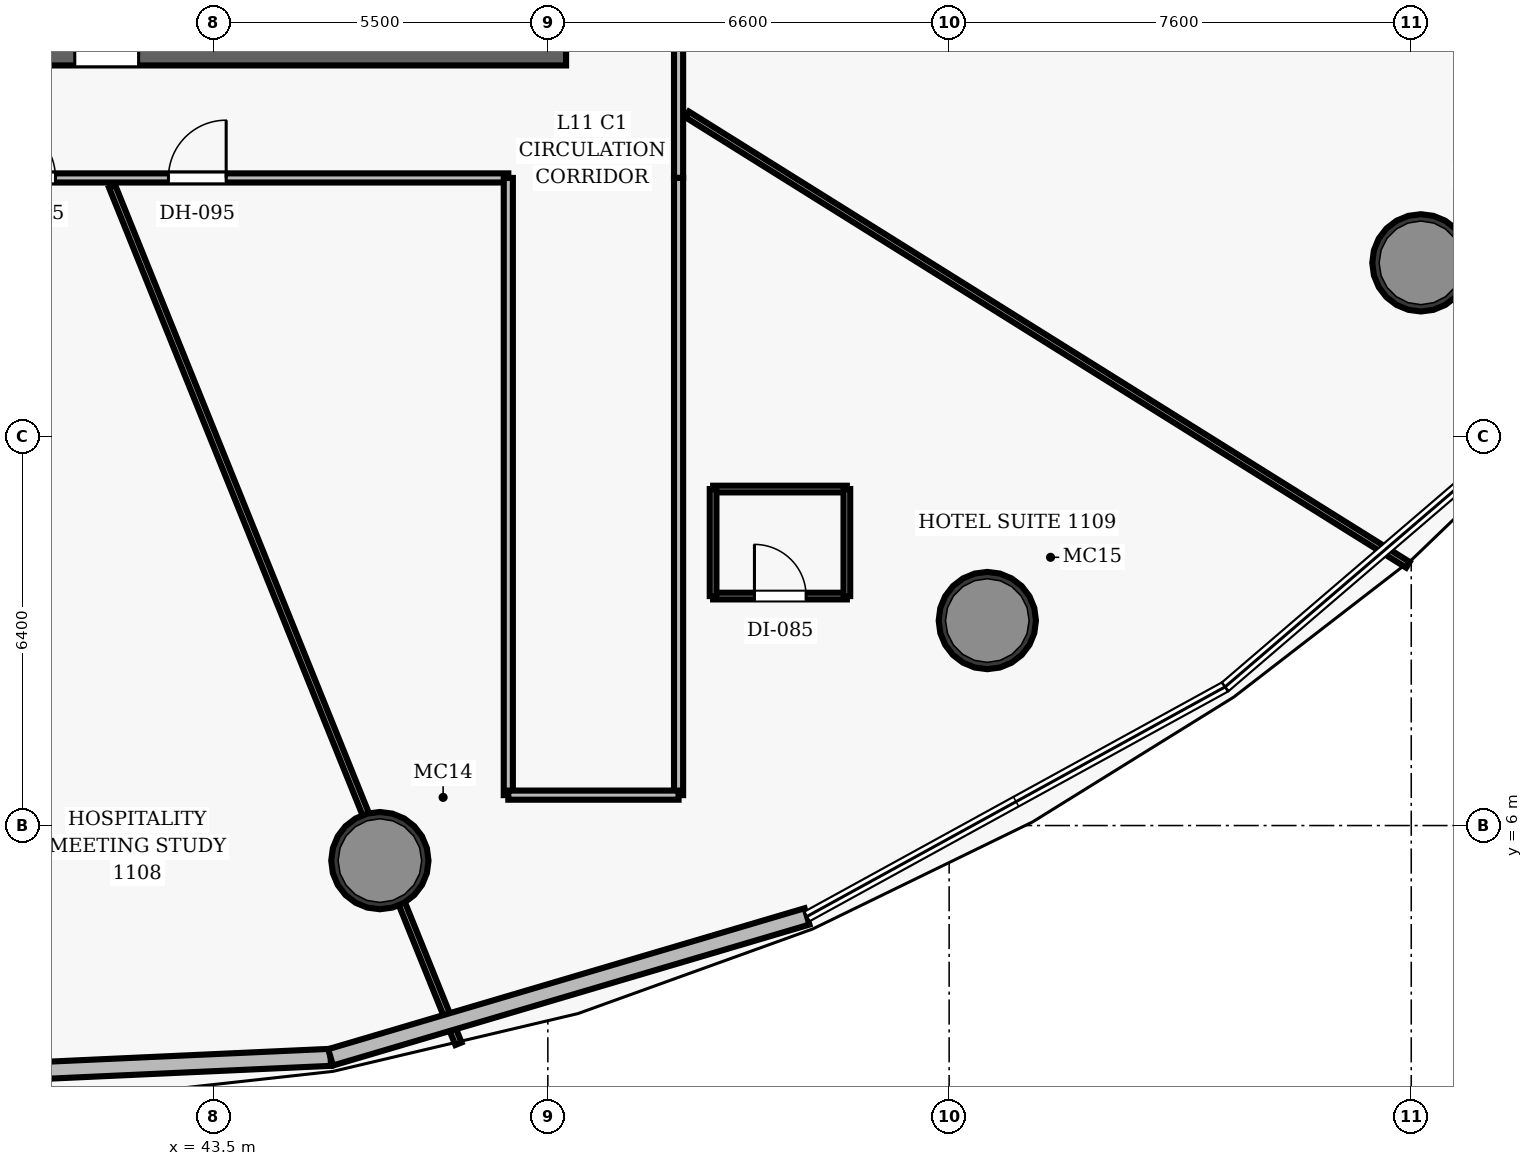
"""IFC4 building model, lengths in metres.
Left out: names, types, materials, properties, quantities, classifications, styles, units other than length and angle.
Written with IfcOpenShell. Run it as: python <this file> out.ifc"""

import sys

from ifc_helpers import new_model, si_unit, direction, frame, frame_2d, origin, origin_2d, place, context, subcontext, project, spatial, rectangle, hollow_circle, extrude, element, fill, save


model = new_model("IFC4")
c1 = context("Model", 3, precision=1e-05, world=origin(), true_north=direction((0.0, 1.0)))
c2 = subcontext(c1, "Body", "Model", "MODEL_VIEW")
j1 = project(units=[si_unit("LENGTHUNIT", "METRE"), si_unit("PLANEANGLEUNIT", "RADIAN")], contexts=[c1])
p1 = place(None, origin())
s1 = spatial("IfcSite", under=j1, at=p1, CompositionType="ELEMENT")
p2 = place(p1, origin())
s2 = spatial("IfcBuilding", under=s1, at=p2, CompositionType="ELEMENT")
p3 = place(p2, frame((0.0, 0.0, 55.4)))
s3 = spatial("IfcBuildingStorey", under=s2, at=p3, CompositionType="ELEMENT", Elevation=55.4)
p4 = place(p3, frame((26.7, 18.8, 0.0), z_axis=(0.0, 0.0, 1.0), x_axis=(1.0, 0.0, 0.0)))
e1 = element("IfcWall", 1, at=p4, inside=s3, PredefinedType="SHEAR", context=c2, shape_type="SweptSolid", body=[
    extrude(rectangle(XDim=22.6, YDim=0.6, at=frame_2d((11.3, 0.0))), origin(), (0.0, 0.0, 1.0), 3.5),
])
p5 = place(p4, frame((14.52, 0.0, 0.0)))
e2 = element("IfcOpeningElement", 2, at=p5, cuts=e1, PredefinedType="OPENING", context=c2, shape_type="SweptSolid", body=[
    extrude(rectangle(XDim=1.05, YDim=2.15, at=frame_2d((0.525, 1.075))), frame((0.0, 0.31, 0.0), z_axis=(0.0, -1.0, 0.0), x_axis=(1.0, 0.0, 0.0)), (0.0, 0.0, 1.0), 0.62),
])
for number, where, z_axis, x_axis in (
    (3, (46.238, 5.423, 0.0), (0.0, 0.0, 1.0), (1.0, 0.0, 0.0)),
    (4, (56.228, 9.371, 0.0), (0.0, 0.0, 1.0), (1.0, 0.0, 0.0)),
    (5, (63.359, 15.254, 0.0), (0.0, 0.0, 1.0), (1.0, 0.0, 0.0)),
):
    element("IfcColumn", number, at=place(p3, frame(where, z_axis=z_axis, x_axis=x_axis)), inside=s3, PredefinedType="COLUMN", context=c2, shape_type="SweptSolid", body=[
        extrude(hollow_circle(Radius=0.8, WallThickness=0.06, at=origin_2d()), origin(), (0.0, 0.0, 1.0), 3.5),
    ])
p6 = place(p3, frame((24.85, 16.65, 0.0), z_axis=(0.0, 0.0, 1.0), x_axis=(1.0, 0.0, 0.0)))
e6 = element("IfcWall", 6, at=p6, inside=s3, PredefinedType="PARTITIONING", context=c2, shape_type="SweptSolid", body=[
    extrude(rectangle(XDim=23.5, YDim=0.15, at=frame_2d((11.75, 0.0))), origin(), (0.0, 0.0, 1.0), 2.6),
])
p7 = place(p6, frame((8.216, 0.0, 0.0)))
e7 = element("IfcOpeningElement", 7, at=p7, cuts=e6, PredefinedType="OPENING", context=c2, shape_type="SweptSolid", body=[
    extrude(rectangle(XDim=0.95, YDim=2.15, at=frame_2d((0.475, 1.075))), frame((0.0, 0.085, 0.0), z_axis=(0.0, -1.0, 0.0), x_axis=(1.0, 0.0, 0.0)), (0.0, 0.0, 1.0), 0.17),
])
p8 = place(p6, frame((15.103, 0.0, 0.0)))
e8 = element("IfcOpeningElement", 8, at=p8, cuts=e6, PredefinedType="OPENING", context=c2, shape_type="SweptSolid", body=[
    extrude(rectangle(XDim=0.95, YDim=2.15, at=frame_2d((0.475, 1.075))), frame((0.0, 0.085, 0.0), z_axis=(0.0, -1.0, 0.0), x_axis=(1.0, 0.0, 0.0)), (0.0, 0.0, 1.0), 0.17),
])
p9 = place(p6, frame((17.91, 0.0, 0.0)))
e9 = element("IfcOpeningElement", 9, at=p9, cuts=e6, PredefinedType="OPENING", context=c2, shape_type="SweptSolid", body=[
    extrude(rectangle(XDim=0.95, YDim=2.15, at=frame_2d((0.475, 1.075))), frame((0.0, 0.085, 0.0), z_axis=(0.0, -1.0, 0.0), x_axis=(1.0, 0.0, 0.0)), (0.0, 0.0, 1.0), 0.17),
])
p10 = place(p3, frame((51.15, 16.65, 0.0), z_axis=(0.0, 0.0, 1.0), x_axis=(0.0, 1.0, 0.0)))
e10 = element("IfcWall", 10, at=p10, inside=s3, PredefinedType="PARTITIONING", context=c2, shape_type="SweptSolid", body=[
    extrude(rectangle(XDim=15.9, YDim=0.15, at=frame_2d((7.95, 0.0))), origin(), (0.0, 0.0, 1.0), 2.6),
])
p11 = place(p10, frame((10.986, 0.0, 0.0)))
e11 = element("IfcOpeningElement", 11, at=p11, cuts=e10, PredefinedType="OPENING", context=c2, shape_type="SweptSolid", body=[
    extrude(rectangle(XDim=0.95, YDim=2.15, at=frame_2d((0.475, 1.075))), frame((0.0, 0.085, 0.0), z_axis=(0.0, -1.0, 0.0), x_axis=(1.0, 0.0, 0.0)), (0.0, 0.0, 1.0), 0.17),
])
p12 = place(p10, frame((7.645, 0.0, 0.0)))
e12 = element("IfcOpeningElement", 12, at=p12, cuts=e10, PredefinedType="OPENING", context=c2, shape_type="SweptSolid", body=[
    extrude(rectangle(XDim=0.95, YDim=2.15, at=frame_2d((0.475, 1.075))), frame((0.0, 0.085, 0.0), z_axis=(0.0, -1.0, 0.0), x_axis=(1.0, 0.0, 0.0)), (0.0, 0.0, 1.0), 0.17),
])
for number, where, z_axis, x_axis in (
    (13, (48.35, 6.5, 0.0), (0.0, 0.0, 1.0), (0.0, 1.0, 0.0)),
    (14, (51.15, 6.5, 0.0), (0.0, 0.0, 1.0), (0.0, 1.0, 0.0)),
):
    element("IfcWall", number, at=place(p3, frame(where, z_axis=z_axis, x_axis=x_axis)), inside=s3, PredefinedType="PARTITIONING", context=c2, shape_type="SweptSolid", body=[
        extrude(rectangle(XDim=10.15, YDim=0.15, at=frame_2d((5.075, 0.0))), origin(), (0.0, 0.0, 1.0), 2.6),
    ])
p13 = place(p3, frame((48.35, 6.5, 0.0), z_axis=(0.0, 0.0, 1.0), x_axis=(1.0, 0.0, 0.0)))
e15 = element("IfcWall", 15, at=p13, inside=s3, PredefinedType="PARTITIONING", context=c2, shape_type="SweptSolid", body=[
    extrude(rectangle(XDim=2.8, YDim=0.15, at=frame_2d((1.4, 0.0))), origin(), (0.0, 0.0, 1.0), 2.6),
])
p14 = place(p3, frame((41.834, 16.51, 0.0), z_axis=(0.0, 0.0, 1.0), x_axis=(0.374602418555, -0.927185541309, 0.0)))
e16 = element("IfcWall", 16, at=p14, inside=s3, PredefinedType="PARTITIONING", context=c2, shape_type="SweptSolid", body=[
    extrude(rectangle(XDim=15.206, YDim=0.11, at=frame_2d((7.603, 0.0))), origin(), (0.0, 0.0, 1.0), 2.6),
])
p15 = place(p3, frame((51.29, 17.696, 0.0), z_axis=(0.0, 0.0, 1.0), x_axis=(0.848046378233, -0.529922013476, 0.0)))
e17 = element("IfcWall", 17, at=p15, inside=s3, PredefinedType="PARTITIONING", context=c2, shape_type="SweptSolid", body=[
    extrude(rectangle(XDim=13.979, YDim=0.11, at=frame_2d((6.989, 0.0))), origin(), (0.0, 0.0, 1.0), 2.6),
])
p16 = place(p3, frame((51.718, 9.774, 0.0), z_axis=(0.0, 0.0, 1.0), x_axis=(1.0, 0.0, 0.0)))
e18 = element("IfcWall", 18, at=p16, inside=s3, PredefinedType="PARTITIONING", context=c2, shape_type="SweptSolid", body=[
    extrude(rectangle(XDim=2.2, YDim=0.11, at=frame_2d((1.1, 0.0))), origin(), (0.0, 0.0, 1.0), 2.6),
])
p17 = place(p16, frame((0.68, 0.0, 0.0)))
e19 = element("IfcOpeningElement", 19, at=p17, cuts=e18, PredefinedType="OPENING", context=c2, shape_type="SweptSolid", body=[
    extrude(rectangle(XDim=0.85, YDim=2.1, at=frame_2d((0.425, 1.05))), frame((0.0, 0.065, 0.0), z_axis=(0.0, -1.0, 0.0), x_axis=(1.0, 0.0, 0.0)), (0.0, 0.0, 1.0), 0.13),
])
p18 = place(p3, frame((51.718, 11.534, 0.0), z_axis=(0.0, 0.0, 1.0), x_axis=(1.0, 0.0, 0.0)))
e20 = element("IfcWall", 20, at=p18, inside=s3, PredefinedType="PARTITIONING", context=c2, shape_type="SweptSolid", body=[
    extrude(rectangle(XDim=2.2, YDim=0.11, at=frame_2d((1.1, 0.0))), origin(), (0.0, 0.0, 1.0), 2.6),
])
for number, where, z_axis, x_axis in (
    (21, (51.718, 9.774, 0.0), (0.0, 0.0, 1.0), (0.0, 1.0, 0.0)),
    (22, (53.918, 9.774, 0.0), (0.0, 0.0, 1.0), (0.0, 1.0, 0.0)),
):
    element("IfcWall", number, at=place(p3, frame(where, z_axis=z_axis, x_axis=x_axis)), inside=s3, PredefinedType="PARTITIONING", context=c2, shape_type="SweptSolid", body=[
        extrude(rectangle(XDim=1.76, YDim=0.11, at=frame_2d((0.88, 0.0))), origin(), (0.0, 0.0, 1.0), 2.6),
    ])
p19 = place(p3, frame((45.427, 2.188, 0.0), z_axis=(0.0, 0.0, 1.0), x_axis=(-0.998965606312, -0.045472160776, 0.0)))
e23 = element("IfcWall", 23, at=p19, inside=s3, PredefinedType="SOLIDWALL", context=c2, shape_type="SweptSolid", body=[
    extrude(rectangle(XDim=8.241, YDim=0.28, at=frame_2d((4.121, 0.0))), origin(), (0.0, 0.0, 1.0), 3.25),
])
p20 = place(p3, frame((53.262, 4.505, 0.0), z_axis=(0.0, 0.0, 1.0), x_axis=(-0.958936659471, -0.283620315075, 0.0)))
e24 = element("IfcWall", 24, at=p20, inside=s3, PredefinedType="SOLIDWALL", context=c2, shape_type="SweptSolid", body=[
    extrude(rectangle(XDim=8.171, YDim=0.28, at=frame_2d((4.085, 0.0))), origin(), (0.0, 0.0, 1.0), 3.25),
])
p21 = place(p8, origin())
e25 = element("IfcDoor", 25, at=p21, inside=s3, OperationType="SINGLE_SWING_LEFT", PredefinedType="DOOR", context=c2, shape_type="SweptSolid", body=[
    extrude(rectangle(XDim=0.95, YDim=2.15, at=frame_2d((0.475, 1.075))), frame((0.0, 0.025, 0.0), z_axis=(0.0, -1.0, 0.0), x_axis=(1.0, 0.0, 0.0)), (0.0, 0.0, 1.0), 0.05),
])
fill(e8, e25)
p22 = place(p9, origin())
e26 = element("IfcDoor", 26, at=p22, inside=s3, OperationType="SINGLE_SWING_RIGHT", PredefinedType="DOOR", context=c2, shape_type="SweptSolid", body=[
    extrude(rectangle(XDim=0.95, YDim=2.15, at=frame_2d((0.475, 1.075))), frame((0.0, 0.025, 0.0), z_axis=(0.0, -1.0, 0.0), x_axis=(1.0, 0.0, 0.0)), (0.0, 0.0, 1.0), 0.05),
])
fill(e9, e26)
p23 = place(p17, origin())
e27 = element("IfcDoor", 27, at=p23, inside=s3, OperationType="SINGLE_SWING_LEFT", PredefinedType="DOOR", context=c2, shape_type="SweptSolid", body=[
    extrude(rectangle(XDim=0.85, YDim=2.1, at=frame_2d((0.425, 1.05))), frame((0.0, 0.025, 0.0), z_axis=(0.0, -1.0, 0.0), x_axis=(1.0, 0.0, 0.0)), (0.0, 0.0, 1.0), 0.05),
])
fill(e19, e27)
save(model, sys.argv[1])
